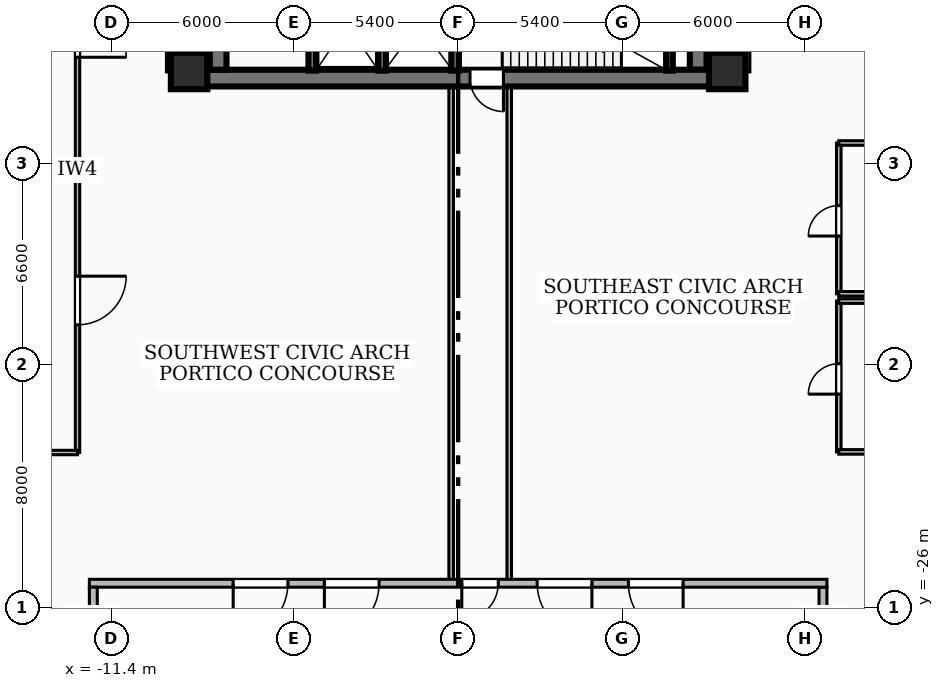
"""IFC4 building model, lengths in metres.
Left out: names, types, materials, properties, quantities, classifications, styles, units other than length and angle.
Written with IfcOpenShell. Run it as: python <this file> out.ifc"""

import sys

from ifc_helpers import new_model, si_unit, direction, frame, frame_2d, origin, origin_2d, place, context, subcontext, project, spatial, rectangle, extrude, element, fill, save


model = new_model("IFC4")
c1 = context("Model", 3, precision=1e-05, world=origin(), true_north=direction((0.0, 1.0)))
c2 = subcontext(c1, "Body", "Model", "MODEL_VIEW")
j1 = project(units=[si_unit("LENGTHUNIT", "METRE"), si_unit("PLANEANGLEUNIT", "RADIAN")], contexts=[c1])
p1 = place(None, origin())
s1 = spatial("IfcSite", under=j1, at=p1, CompositionType="ELEMENT")
p2 = place(p1, origin())
s2 = spatial("IfcBuilding", under=s1, at=p2, CompositionType="ELEMENT")
p3 = place(p2, origin())
s3 = spatial("IfcBuildingStorey", under=s2, at=p3, CompositionType="ELEMENT", Elevation=0.0)
p4 = place(p3, frame((8.78, -8.585, 0.0), z_axis=(0.0, 0.0, 1.0), x_axis=(-1.0, 0.0, 0.0)))
e1 = element("IfcWall", 1, at=p4, inside=s3, PredefinedType="SHEAR", context=c2, shape_type="SweptSolid", body=[
    extrude(rectangle(XDim=17.56, YDim=0.55, at=frame_2d((8.78, 0.0))), origin(), (0.0, 0.0, 1.0), 5.08),
])
p5 = place(p4, frame((7.29, 0.0, 0.0)))
e2 = element("IfcOpeningElement", 2, at=p5, cuts=e1, PredefinedType="OPENING", context=c2, shape_type="SweptSolid", body=[
    extrude(rectangle(XDim=1.1, YDim=2.15, at=frame_2d((0.55, 1.075))), frame((0.0, 0.285, 0.0), z_axis=(0.0, -1.0, 0.0), x_axis=(1.0, 0.0, 0.0)), (0.0, 0.0, 1.0), 0.57),
])
for number, where, z_axis, x_axis in (
    (3, (-7.895, -8.31, 0.0), (0.0, 0.0, 1.0), (0.0, 1.0, 0.0)),
    (4, (7.895, -2.025, 0.0), (0.0, 0.0, 1.0), (0.0, -1.0, 0.0)),
):
    element("IfcWall", number, at=place(p3, frame(where, z_axis=z_axis, x_axis=x_axis)), inside=s3, PredefinedType="SHEAR", context=c2, shape_type="SweptSolid", body=[
        extrude(rectangle(XDim=6.285, YDim=0.55, at=frame_2d((3.143, 0.0))), origin(), (0.0, 0.0, 1.0), 5.08),
    ])
p6 = place(p3, frame((6.95, -8.34, 0.0), z_axis=(0.0, 0.0, 1.0), x_axis=(0.0, 1.0, 0.0)))
e5 = element("IfcWall", 5, at=p6, inside=s3, PredefinedType="SOLIDWALL", context=c2, shape_type="SweptSolid", body=[
    extrude(rectangle(XDim=3.06, YDim=0.22, at=frame_2d((1.53, 0.0))), origin(), (0.0, 0.0, 1.0), 5.08),
])
for number, where, z_axis, x_axis in (
    (6, (-0.1, -8.34, 0.0), (0.0, 0.0, 1.0), (0.0, 1.0, 0.0)),
    (7, (-2.5, -8.34, 0.0), (0.0, 0.0, 1.0), (0.0, 1.0, 0.0)),
    (8, (-4.8, -8.34, 0.0), (0.0, 0.0, 1.0), (0.0, 1.0, 0.0)),
):
    element("IfcWall", number, at=place(p3, frame(where, z_axis=z_axis, x_axis=x_axis)), inside=s3, PredefinedType="SOLIDWALL", context=c2, shape_type="SweptSolid", body=[
        extrude(rectangle(XDim=3.04, YDim=0.25, at=frame_2d((1.52, 0.0))), origin(), (0.0, 0.0, 1.0), 5.08),
    ])
for number, where, z_axis, x_axis in (
    (9, (8.85, -8.35, 0.0), (0.0, 0.0, 1.0), (1.0, 0.0, 0.0)),
    (10, (-8.85, -8.35, 0.0), (0.0, 0.0, 1.0), (1.0, 0.0, 0.0)),
):
    element("IfcColumn", number, at=place(p3, frame(where, z_axis=z_axis, x_axis=x_axis)), inside=s3, PredefinedType="COLUMN", context=c2, shape_type="SweptSolid", body=[
        extrude(rectangle(XDim=1.2, YDim=1.2, at=origin_2d()), origin(), (0.0, 0.0, 1.0), 5.4),
    ])
p7 = place(p3, frame((12.0, -27.34, 0.0), z_axis=(0.0, 0.0, 1.0), x_axis=(0.0, 1.0, 0.0)))
e11 = element("IfcWall", 11, at=p7, inside=s3, PredefinedType="SOLIDWALL", context=c2, shape_type="SweptSolid", body=[
    extrude(rectangle(XDim=2.01, YDim=0.26, at=frame_2d((1.005, 0.0))), origin(), (0.0, 0.0, 1.0), 4.09),
])
p8 = place(p3, frame((12.13, -25.2, 0.0), z_axis=(0.0, 0.0, 1.0), x_axis=(-1.0, 0.0, 0.0)))
e12 = element("IfcWall", 12, at=p8, inside=s3, PredefinedType="SOLIDWALL", context=c2, shape_type="SweptSolid", body=[
    extrude(rectangle(XDim=24.26, YDim=0.26, at=frame_2d((12.13, 0.0))), origin(), (0.0, 0.0, 1.0), 4.09),
])
p9 = place(p8, frame((10.81, 0.0, 0.0)))
e13 = element("IfcOpeningElement", 13, at=p9, cuts=e12, PredefinedType="OPENING", context=c2, shape_type="SweptSolid", body=[
    extrude(rectangle(XDim=1.2, YDim=2.15, at=frame_2d((0.6, 1.075))), frame((0.0, 0.14, 0.0), z_axis=(0.0, -1.0, 0.0), x_axis=(1.0, 0.0, 0.0)), (0.0, 0.0, 1.0), 0.28),
])
p10 = place(p8, frame((4.73, 0.0, 0.0)))
e14 = element("IfcOpeningElement", 14, at=p10, cuts=e12, PredefinedType="OPENING", context=c2, shape_type="SweptSolid", body=[
    extrude(rectangle(XDim=1.8, YDim=2.3, at=frame_2d((0.9, 1.15))), frame((0.0, 0.14, 0.0), z_axis=(0.0, -1.0, 0.0), x_axis=(1.0, 0.0, 0.0)), (0.0, 0.0, 1.0), 0.28),
])
p11 = place(p8, frame((7.73, 0.0, 0.0)))
e15 = element("IfcOpeningElement", 15, at=p11, cuts=e12, PredefinedType="OPENING", context=c2, shape_type="SweptSolid", body=[
    extrude(rectangle(XDim=1.8, YDim=2.3, at=frame_2d((0.9, 1.15))), frame((0.0, 0.14, 0.0), z_axis=(0.0, -1.0, 0.0), x_axis=(1.0, 0.0, 0.0)), (0.0, 0.0, 1.0), 0.28),
])
p12 = place(p8, frame((14.73, 0.0, 0.0)))
e16 = element("IfcOpeningElement", 16, at=p12, cuts=e12, PredefinedType="OPENING", context=c2, shape_type="SweptSolid", body=[
    extrude(rectangle(XDim=1.8, YDim=2.3, at=frame_2d((0.9, 1.15))), frame((0.0, 0.14, 0.0), z_axis=(0.0, -1.0, 0.0), x_axis=(1.0, 0.0, 0.0)), (0.0, 0.0, 1.0), 0.28),
])
p13 = place(p8, frame((17.73, 0.0, 0.0)))
e17 = element("IfcOpeningElement", 17, at=p13, cuts=e12, PredefinedType="OPENING", context=c2, shape_type="SweptSolid", body=[
    extrude(rectangle(XDim=1.8, YDim=2.3, at=frame_2d((0.9, 1.15))), frame((0.0, 0.14, 0.0), z_axis=(0.0, -1.0, 0.0), x_axis=(1.0, 0.0, 0.0)), (0.0, 0.0, 1.0), 0.28),
])
p14 = place(p3, frame((-12.0, -25.33, 0.0), z_axis=(0.0, 0.0, 1.0), x_axis=(0.0, -1.0, 0.0)))
e18 = element("IfcWall", 18, at=p14, inside=s3, PredefinedType="SOLIDWALL", context=c2, shape_type="SweptSolid", body=[
    extrude(rectangle(XDim=2.01, YDim=0.26, at=frame_2d((1.005, 0.0))), origin(), (0.0, 0.0, 1.0), 4.09),
])
for number, where, z_axis, x_axis in (
    (19, (-9.52, -8.38, 0.0), (0.0, 0.0, 1.0), (0.0, 1.0, 0.0)),
    (20, (9.52, -8.38, 0.0), (0.0, 0.0, 1.0), (0.0, 1.0, 0.0)),
):
    element("IfcWall", number, at=place(p3, frame(where, z_axis=z_axis, x_axis=x_axis)), inside=s3, PredefinedType="PARTITIONING", context=c2, shape_type="SweptSolid", body=[
        extrude(rectangle(XDim=6.63, YDim=0.15, at=frame_2d((3.315, 0.0))), origin(), (0.0, 0.0, 1.0), 4.09),
    ])
for number, where, z_axis, x_axis in (
    (21, (-0.23, -25.15, 0.0), (0.0, 0.0, 1.0), (0.0, 1.0, 0.0)),
    (22, (1.68, -25.15, 0.0), (0.0, 0.0, 1.0), (0.0, 1.0, 0.0)),
):
    element("IfcWall", number, at=place(p3, frame(where, z_axis=z_axis, x_axis=x_axis)), inside=s3, PredefinedType="PARTITIONING", context=c2, shape_type="SweptSolid", body=[
        extrude(rectangle(XDim=16.45, YDim=0.15, at=frame_2d((8.225, 0.0))), origin(), (0.0, 0.0, 1.0), 5.08),
    ])
p15 = place(p3, frame((-12.52, -2.3, 0.0), z_axis=(0.0, 0.0, 1.0), x_axis=(0.0, -1.0, 0.0)))
e23 = element("IfcWall", 23, at=p15, inside=s3, PredefinedType="PARTITIONING", context=c2, shape_type="SweptSolid", body=[
    extrude(rectangle(XDim=18.6, YDim=0.145, at=frame_2d((9.3, 0.0))), origin(), (0.0, 0.0, 1.0), 4.09),
])
p16 = place(p15, frame((12.8, 0.0, 0.0)))
e24 = element("IfcOpeningElement", 24, at=p16, cuts=e23, PredefinedType="OPENING", context=c2, shape_type="SweptSolid", body=[
    extrude(rectangle(XDim=1.6, YDim=2.15, at=frame_2d((0.8, 1.075))), frame((0.0, 0.083, 0.0), z_axis=(0.0, -1.0, 0.0), x_axis=(1.0, 0.0, 0.0)), (0.0, 0.0, 1.0), 0.165),
])
p17 = place(p15, frame((4.0, 0.0, 0.0)))
e25 = element("IfcOpeningElement", 25, at=p17, cuts=e23, PredefinedType="OPENING", context=c2, shape_type="SweptSolid", body=[
    extrude(rectangle(XDim=1.6, YDim=2.15, at=frame_2d((0.8, 1.075))), frame((0.0, 0.083, 0.0), z_axis=(0.0, -1.0, 0.0), x_axis=(1.0, 0.0, 0.0)), (0.0, 0.0, 1.0), 0.165),
])
p18 = place(p3, frame((-22.9, -20.9, 0.0), z_axis=(0.0, 0.0, 1.0), x_axis=(1.0, 0.0, 0.0)))
e26 = element("IfcWall", 26, at=p18, inside=s3, PredefinedType="PARTITIONING", context=c2, shape_type="SweptSolid", body=[
    extrude(rectangle(XDim=10.38, YDim=0.145, at=frame_2d((5.19, 0.0))), origin(), (0.0, 0.0, 1.0), 5.08),
])
p19 = place(p3, frame((12.52, -20.88, 0.0), z_axis=(0.0, 0.0, 1.0), x_axis=(0.0, 1.0, 0.0)))
e27 = element("IfcWall", 27, at=p19, inside=s3, PredefinedType="PARTITIONING", context=c2, shape_type="SweptSolid", body=[
    extrude(rectangle(XDim=4.96, YDim=0.15, at=frame_2d((2.48, 0.0))), origin(), (0.0, 0.0, 1.0), 5.08),
])
p20 = place(p19, frame((1.9, 0.0, 0.0)))
e28 = element("IfcOpeningElement", 28, at=p20, cuts=e27, PredefinedType="OPENING", context=c2, shape_type="SweptSolid", body=[
    extrude(rectangle(XDim=1.0, YDim=2.1, at=frame_2d((0.5, 1.05))), frame((0.0, 0.085, 0.0), z_axis=(0.0, -1.0, 0.0), x_axis=(1.0, 0.0, 0.0)), (0.0, 0.0, 1.0), 0.17),
])
for number, where, z_axis, x_axis in (
    (29, (12.52, -20.88, 0.0), (0.0, 0.0, 1.0), (1.0, 0.0, 0.0)),
    (30, (12.52, -15.92, 0.0), (0.0, 0.0, 1.0), (1.0, 0.0, 0.0)),
):
    element("IfcWall", number, at=place(p3, frame(where, z_axis=z_axis, x_axis=x_axis)), inside=s3, PredefinedType="PARTITIONING", context=c2, shape_type="SweptSolid", body=[
        extrude(rectangle(XDim=10.08, YDim=0.15, at=frame_2d((5.04, 0.0))), origin(), (0.0, 0.0, 1.0), 5.08),
    ])
p21 = place(p3, frame((12.52, -15.68, 0.0), z_axis=(0.0, 0.0, 1.0), x_axis=(0.0, 1.0, 0.0)))
e31 = element("IfcWall", 31, at=p21, inside=s3, PredefinedType="PARTITIONING", context=c2, shape_type="SweptSolid", body=[
    extrude(rectangle(XDim=4.96, YDim=0.15, at=frame_2d((2.48, 0.0))), origin(), (0.0, 0.0, 1.0), 5.08),
])
p22 = place(p21, frame((1.9, 0.0, 0.0)))
e32 = element("IfcOpeningElement", 32, at=p22, cuts=e31, PredefinedType="OPENING", context=c2, shape_type="SweptSolid", body=[
    extrude(rectangle(XDim=1.0, YDim=2.1, at=frame_2d((0.5, 1.05))), frame((0.0, 0.085, 0.0), z_axis=(0.0, -1.0, 0.0), x_axis=(1.0, 0.0, 0.0)), (0.0, 0.0, 1.0), 0.17),
])
for number, where, z_axis, x_axis in (
    (33, (12.52, -15.68, 0.0), (0.0, 0.0, 1.0), (1.0, 0.0, 0.0)),
    (34, (12.52, -10.72, 0.0), (0.0, 0.0, 1.0), (1.0, 0.0, 0.0)),
):
    element("IfcWall", number, at=place(p3, frame(where, z_axis=z_axis, x_axis=x_axis)), inside=s3, PredefinedType="PARTITIONING", context=c2, shape_type="SweptSolid", body=[
        extrude(rectangle(XDim=10.08, YDim=0.15, at=frame_2d((5.04, 0.0))), origin(), (0.0, 0.0, 1.0), 5.08),
    ])
p23 = place(p9, origin())
e35 = element("IfcDoor", 35, at=p23, inside=s3, OperationType="SINGLE_SWING_RIGHT", PredefinedType="DOOR", context=c2, shape_type="SweptSolid", body=[
    extrude(rectangle(XDim=1.2, YDim=2.15, at=frame_2d((0.6, 1.075))), frame((0.0, 0.025, 0.0), z_axis=(0.0, -1.0, 0.0), x_axis=(1.0, 0.0, 0.0)), (0.0, 0.0, 1.0), 0.05),
])
fill(e13, e35)
p24 = place(p10, origin())
e36 = element("IfcDoor", 36, at=p24, inside=s3, OperationType="SINGLE_SWING_LEFT", PredefinedType="DOOR", context=c2, shape_type="SweptSolid", body=[
    extrude(rectangle(XDim=1.8, YDim=2.3, at=frame_2d((0.9, 1.15))), frame((0.0, 0.025, 0.0), z_axis=(0.0, -1.0, 0.0), x_axis=(1.0, 0.0, 0.0)), (0.0, 0.0, 1.0), 0.05),
])
fill(e14, e36)
p25 = place(p11, origin())
e37 = element("IfcDoor", 37, at=p25, inside=s3, OperationType="SINGLE_SWING_LEFT", PredefinedType="DOOR", context=c2, shape_type="SweptSolid", body=[
    extrude(rectangle(XDim=1.8, YDim=2.3, at=frame_2d((0.9, 1.15))), frame((0.0, 0.025, 0.0), z_axis=(0.0, -1.0, 0.0), x_axis=(1.0, 0.0, 0.0)), (0.0, 0.0, 1.0), 0.05),
])
fill(e15, e37)
p26 = place(p12, origin())
e38 = element("IfcDoor", 38, at=p26, inside=s3, OperationType="SINGLE_SWING_RIGHT", PredefinedType="DOOR", context=c2, shape_type="SweptSolid", body=[
    extrude(rectangle(XDim=1.8, YDim=2.3, at=frame_2d((0.9, 1.15))), frame((0.0, 0.025, 0.0), z_axis=(0.0, -1.0, 0.0), x_axis=(1.0, 0.0, 0.0)), (0.0, 0.0, 1.0), 0.05),
])
fill(e16, e38)
p27 = place(p13, origin())
e39 = element("IfcDoor", 39, at=p27, inside=s3, OperationType="SINGLE_SWING_RIGHT", PredefinedType="DOOR", context=c2, shape_type="SweptSolid", body=[
    extrude(rectangle(XDim=1.8, YDim=2.3, at=frame_2d((0.9, 1.15))), frame((0.0, 0.025, 0.0), z_axis=(0.0, -1.0, 0.0), x_axis=(1.0, 0.0, 0.0)), (0.0, 0.0, 1.0), 0.05),
])
fill(e17, e39)
p28 = place(p5, origin())
e40 = element("IfcDoor", 40, at=p28, inside=s3, OperationType="SINGLE_SWING_LEFT", PredefinedType="DOOR", context=c2, shape_type="SweptSolid", body=[
    extrude(rectangle(XDim=1.1, YDim=2.15, at=frame_2d((0.55, 1.075))), frame((0.0, 0.025, 0.0), z_axis=(0.0, -1.0, 0.0), x_axis=(1.0, 0.0, 0.0)), (0.0, 0.0, 1.0), 0.05),
])
fill(e2, e40)
p29 = place(p16, origin())
e41 = element("IfcDoor", 41, at=p29, inside=s3, OperationType="SINGLE_SWING_LEFT", PredefinedType="DOOR", context=c2, shape_type="SweptSolid", body=[
    extrude(rectangle(XDim=1.6, YDim=2.15, at=frame_2d((0.8, 1.075))), frame((0.0, 0.025, 0.0), z_axis=(0.0, -1.0, 0.0), x_axis=(1.0, 0.0, 0.0)), (0.0, 0.0, 1.0), 0.05),
])
fill(e24, e41)
p30 = place(p17, origin())
e42 = element("IfcDoor", 42, at=p30, inside=s3, OperationType="SINGLE_SWING_RIGHT", PredefinedType="DOOR", context=c2, shape_type="SweptSolid", body=[
    extrude(rectangle(XDim=1.6, YDim=2.15, at=frame_2d((0.8, 1.075))), frame((0.0, 0.025, 0.0), z_axis=(0.0, -1.0, 0.0), x_axis=(1.0, 0.0, 0.0)), (0.0, 0.0, 1.0), 0.05),
])
fill(e25, e42)
p31 = place(p20, origin())
e43 = element("IfcDoor", 43, at=p31, inside=s3, OperationType="SINGLE_SWING_LEFT", PredefinedType="DOOR", context=c2, shape_type="SweptSolid", body=[
    extrude(rectangle(XDim=1.0, YDim=2.1, at=frame_2d((0.5, 1.05))), frame((0.0, 0.025, 0.0), z_axis=(0.0, -1.0, 0.0), x_axis=(1.0, 0.0, 0.0)), (0.0, 0.0, 1.0), 0.05),
])
fill(e28, e43)
p32 = place(p22, origin())
e44 = element("IfcDoor", 44, at=p32, inside=s3, OperationType="SINGLE_SWING_LEFT", PredefinedType="DOOR", context=c2, shape_type="SweptSolid", body=[
    extrude(rectangle(XDim=1.0, YDim=2.1, at=frame_2d((0.5, 1.05))), frame((0.0, 0.025, 0.0), z_axis=(0.0, -1.0, 0.0), x_axis=(1.0, 0.0, 0.0)), (0.0, 0.0, 1.0), 0.05),
])
fill(e32, e44)
save(model, sys.argv[1])
